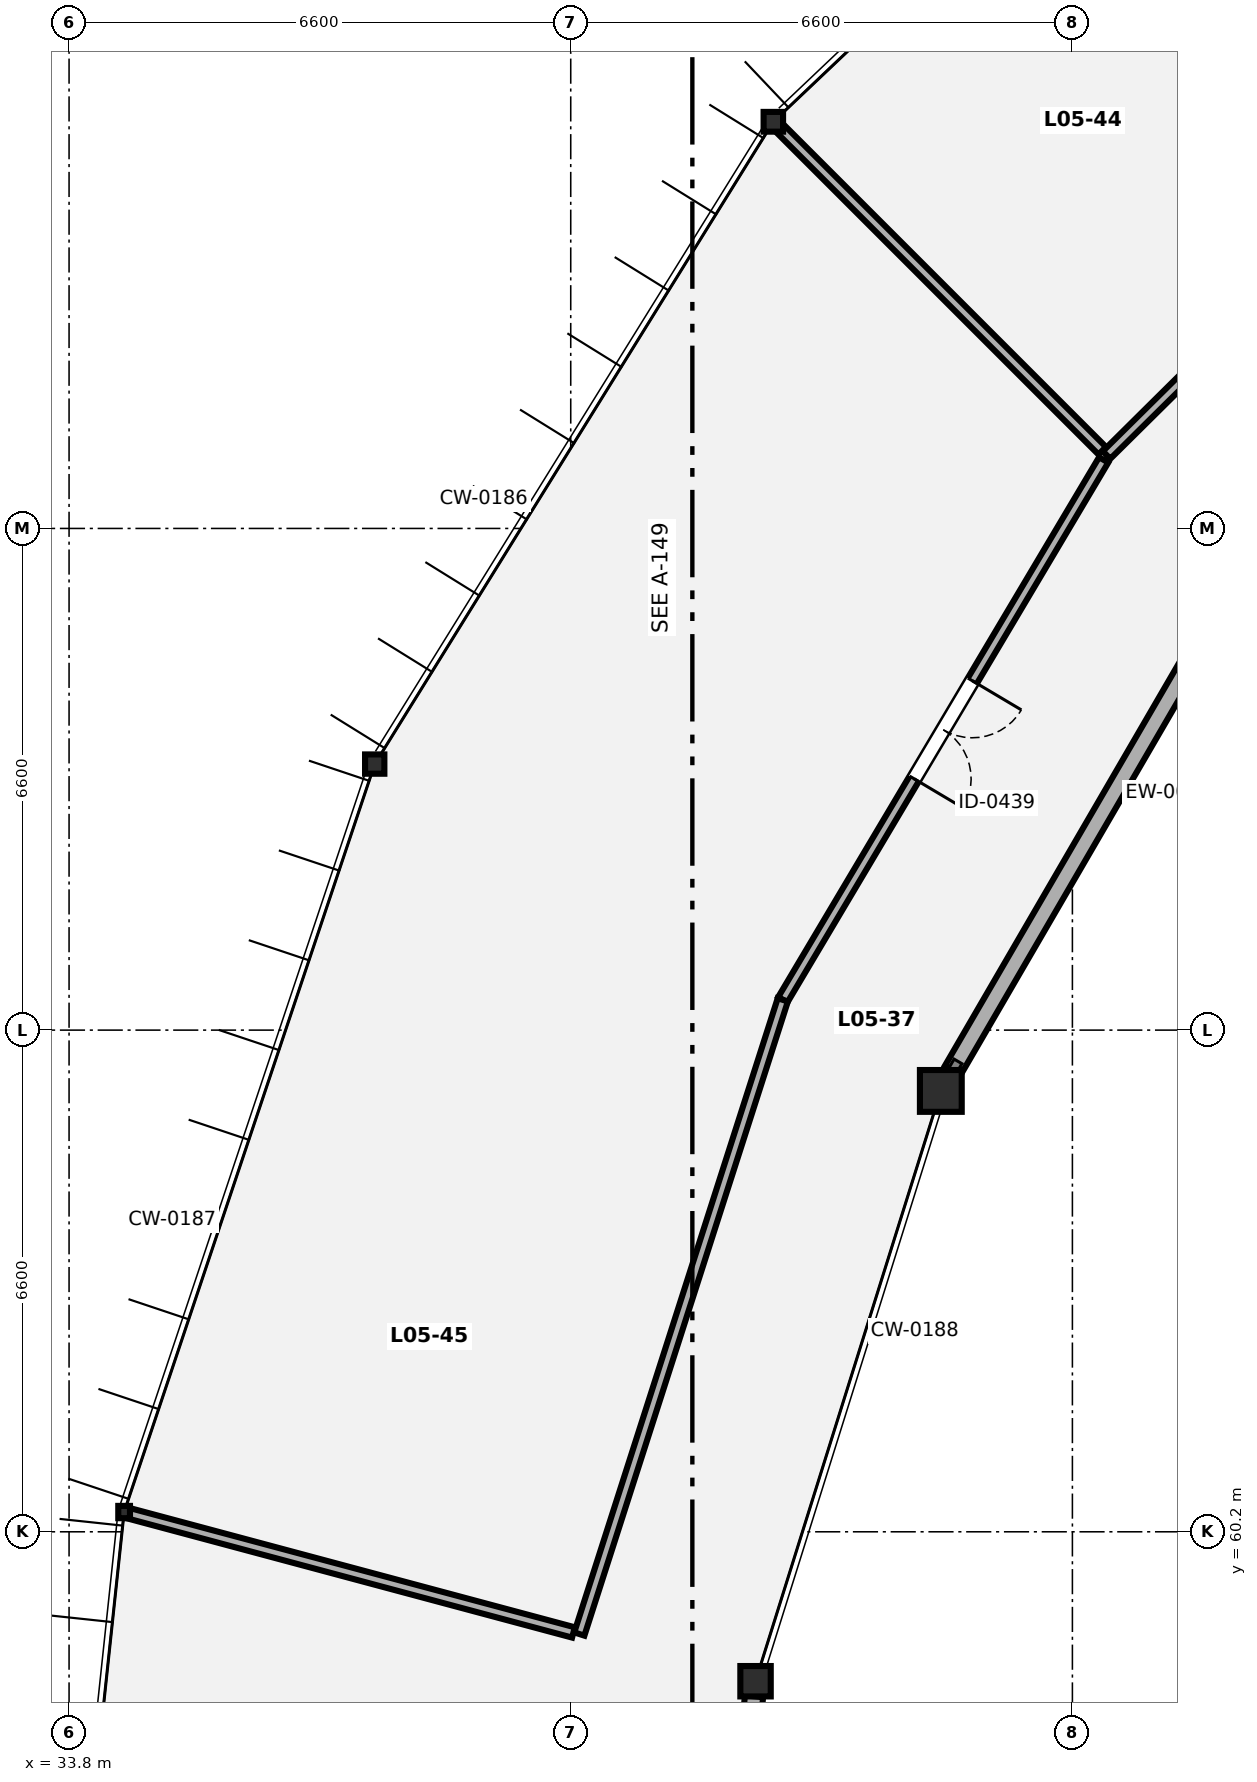
"""IFC4 building model, lengths in metres.
Left out: names, types, materials, properties, quantities, classifications, styles, units other than length and angle.
Written with IfcOpenShell. Run it as: python <this file> out.ifc"""

import sys

from ifc_helpers import new_model, si_unit, direction, frame, frame_2d, origin, origin_2d, place, context, subcontext, project, spatial, rectangle, i_section, extrude, element, fill, save


model = new_model("IFC4")
c1 = context("Model", 3, precision=1e-05, world=origin(), true_north=direction((0.0, 1.0)))
c2 = subcontext(c1, "Body", "Model", "MODEL_VIEW")
j1 = project(units=[si_unit("LENGTHUNIT", "METRE"), si_unit("PLANEANGLEUNIT", "RADIAN")], contexts=[c1])
p1 = place(None, origin())
s1 = spatial("IfcSite", under=j1, at=p1, CompositionType="ELEMENT")
p2 = place(p1, origin())
s2 = spatial("IfcBuilding", under=s1, at=p2, CompositionType="ELEMENT")
p3 = place(p2, frame((0.0, 0.0, 21.7)))
s3 = spatial("IfcBuildingStorey", under=s2, at=p3, CompositionType="ELEMENT", Elevation=21.7)
p4 = place(p3, frame((43.065, 78.75, 0.0), z_axis=(0.0, 0.0, 1.0), x_axis=(1.0, 0.0, 0.0)))
e1 = element("IfcColumn", 1, at=p4, inside=s3, PredefinedType="COLUMN", context=c2, shape_type="SweptSolid", body=[
    extrude(i_section(OverallWidth=0.256, OverallDepth=0.26, WebThickness=0.01, FlangeThickness=0.017, FilletRadius=0.014, at=origin_2d()), origin(), (0.0, 0.0, 1.0), 4.2),
])
p5 = place(p3, frame((37.821, 70.3, 0.0), z_axis=(0.0, 0.0, 1.0), x_axis=(1.0, 0.0, 0.0)))
e2 = element("IfcColumn", 2, at=p5, inside=s3, PredefinedType="COLUMN", context=c2, shape_type="SweptSolid", body=[
    extrude(i_section(OverallWidth=0.254, OverallDepth=0.254, WebThickness=0.009, FlangeThickness=0.014, FilletRadius=0.014, at=origin_2d()), origin(), (0.0, 0.0, 1.0), 4.2),
])
p6 = place(p3, frame((45.269, 66.0, 0.0), z_axis=(0.0, 0.0, 1.0), x_axis=(1.0, 0.0, 0.0)))
e3 = element("IfcColumn", 3, at=p6, inside=s3, PredefinedType="COLUMN", context=c2, shape_type="SweptSolid", body=[
    extrude(rectangle(XDim=0.55, YDim=0.55, at=origin_2d()), origin(), (0.0, 0.0, 1.0), 4.2),
])
p7 = place(p3, frame((34.524, 60.46, 0.0), z_axis=(0.0, 0.0, 1.0), x_axis=(1.0, 0.0, 0.0)))
e4 = element("IfcColumn", 4, at=p7, inside=s3, PredefinedType="COLUMN", context=c2, shape_type="SweptSolid", body=[
    extrude(i_section(OverallWidth=0.154, OverallDepth=0.162, WebThickness=0.008, FlangeThickness=0.011, FilletRadius=0.009, at=origin_2d()), origin(), (0.0, 0.0, 1.0), 4.2),
])
p8 = place(p3, frame((42.831, 58.234, 0.0), z_axis=(0.0, 0.0, 1.0), x_axis=(1.0, 0.0, 0.0)))
e5 = element("IfcColumn", 5, at=p8, inside=s3, PredefinedType="PILASTER", context=c2, shape_type="SweptSolid", body=[
    extrude(rectangle(XDim=0.4, YDim=0.4, at=origin_2d()), origin(), (0.0, 0.0, 1.0), 4.2),
])
p9 = place(p3, frame((49.086, 72.565, 0.0), z_axis=(0.0, 0.0, 1.0), x_axis=(-0.502637947221, -0.864497017932, 0.0)))
e6 = element("IfcWall", 6, at=p9, inside=s3, PredefinedType="SOLIDWALL", context=c2, shape_type="SweptSolid", body=[
    extrude(rectangle(XDim=7.279, YDim=0.24, at=frame_2d((3.639, 0.0))), origin(), (0.0, 0.0, 1.0), 3.65),
])
p10 = place(p3, frame((42.812, 58.036, 0.0), z_axis=(0.0, 0.0, 1.0), x_axis=(-0.099255190182, -0.995062011747, 0.0)))
e7 = element("IfcWall", 7, at=p10, inside=s3, PredefinedType="SOLIDWALL", context=c2, shape_type="SweptSolid", body=[
    extrude(rectangle(XDim=8.073, YDim=0.24, at=frame_2d((4.036, 0.0))), origin(), (0.0, 0.0, 1.0), 3.65),
])
p11 = place(p10, frame((3.311, 0.0, 0.85)))
e8 = element("IfcOpeningElement", 8, at=p11, cuts=e7, PredefinedType="OPENING", context=c2, shape_type="SweptSolid", body=[
    extrude(rectangle(XDim=1.45, YDim=1.25, at=frame_2d((0.725, 0.625))), frame((0.0, 0.13, 0.0), z_axis=(0.0, -1.0, 0.0), x_axis=(1.0, 0.0, 0.0)), (0.0, 0.0, 1.0), 0.26),
])
p12 = place(p3, frame((52.999, 79.863, 0.0), z_axis=(0.0, 0.0, 1.0), x_axis=(-0.710427757183, -0.703770134222, 0.0)))
e9 = element("IfcWall", 9, at=p12, inside=s3, PredefinedType="PARTITIONING", context=c2, shape_type="SweptSolid", body=[
    extrude(rectangle(XDim=7.811, YDim=0.14, at=frame_2d((3.905, 0.0))), origin(), (0.0, 0.0, 1.0), 3.98),
])
p13 = place(p12, frame((3.381, 0.0, 0.0)))
e10 = element("IfcOpeningElement", 10, at=p13, cuts=e9, PredefinedType="OPENING", context=c2, shape_type="SweptSolid", body=[
    extrude(rectangle(XDim=1.05, YDim=2.15, at=frame_2d((0.525, 1.075))), frame((0.0, 0.08, 0.0), z_axis=(0.0, -1.0, 0.0), x_axis=(1.0, 0.0, 0.0)), (0.0, 0.0, 1.0), 0.16),
])
p14 = place(p3, frame((47.393, 74.423, 0.0), z_axis=(0.0, 0.0, 1.0), x_axis=(-0.707106781187, 0.707106781187, 0.0)))
e11 = element("IfcWall", 11, at=p14, inside=s3, PredefinedType="PARTITIONING", context=c2, shape_type="SweptSolid", body=[
    extrude(rectangle(XDim=6.06, YDim=0.14, at=frame_2d((3.03, 0.0))), origin(), (0.0, 0.0, 1.0), 3.323),
])
p15 = place(p3, frame((47.412, 74.302, 0.0), z_axis=(0.0, 0.0, 1.0), x_axis=(-0.51092787214, -0.85962358592, 0.0)))
e12 = element("IfcWall", 12, at=p15, inside=s3, PredefinedType="PARTITIONING", context=c2, shape_type="SweptSolid", body=[
    extrude(rectangle(XDim=8.262, YDim=0.14, at=frame_2d((4.131, 0.0))), origin(), (0.0, 0.0, 1.0), 3.98),
])
p16 = place(p15, frame((3.381, 0.0, 0.0)))
e13 = element("IfcOpeningElement", 13, at=p16, cuts=e12, PredefinedType="OPENING", context=c2, shape_type="SweptSolid", body=[
    extrude(rectangle(XDim=1.5, YDim=2.15, at=frame_2d((0.75, 1.075))), frame((0.0, 0.08, 0.0), z_axis=(0.0, -1.0, 0.0), x_axis=(1.0, 0.0, 0.0)), (0.0, 0.0, 1.0), 0.16),
])
p17 = place(p3, frame((43.19, 67.198, 0.0), z_axis=(0.0, 0.0, 1.0), x_axis=(-0.305499533667, -0.952192225829, 0.0)))
e14 = element("IfcWall", 14, at=p17, inside=s3, PredefinedType="PARTITIONING", context=c2, shape_type="SweptSolid", body=[
    extrude(rectangle(XDim=8.762, YDim=0.14, at=frame_2d((4.381, 0.0))), origin(), (0.0, 0.0, 1.0), 3.98),
])
p18 = place(p3, frame((40.436, 58.876, 0.0), z_axis=(0.0, 0.0, 1.0), x_axis=(-0.965916578341, 0.258853556448, 0.0)))
e15 = element("IfcWall", 15, at=p18, inside=s3, PredefinedType="PARTITIONING", context=c2, shape_type="SweptSolid", body=[
    extrude(rectangle(XDim=6.06, YDim=0.14, at=frame_2d((3.03, 0.0))), origin(), (0.0, 0.0, 1.0), 3.465),
])
p19 = place(p16, origin())
e16 = element("IfcDoor", 16, at=p19, inside=s3, OperationType="DOUBLE_DOOR_SINGLE_SWING", PredefinedType="DOOR", context=c2, shape_type="SweptSolid", body=[
    extrude(rectangle(XDim=1.5, YDim=2.15, at=frame_2d((0.75, 1.075))), frame((0.0, 0.025, 0.0), z_axis=(0.0, -1.0, 0.0), x_axis=(1.0, 0.0, 0.0)), (0.0, 0.0, 1.0), 0.05),
])
fill(e13, e16)
save(model, sys.argv[1])
